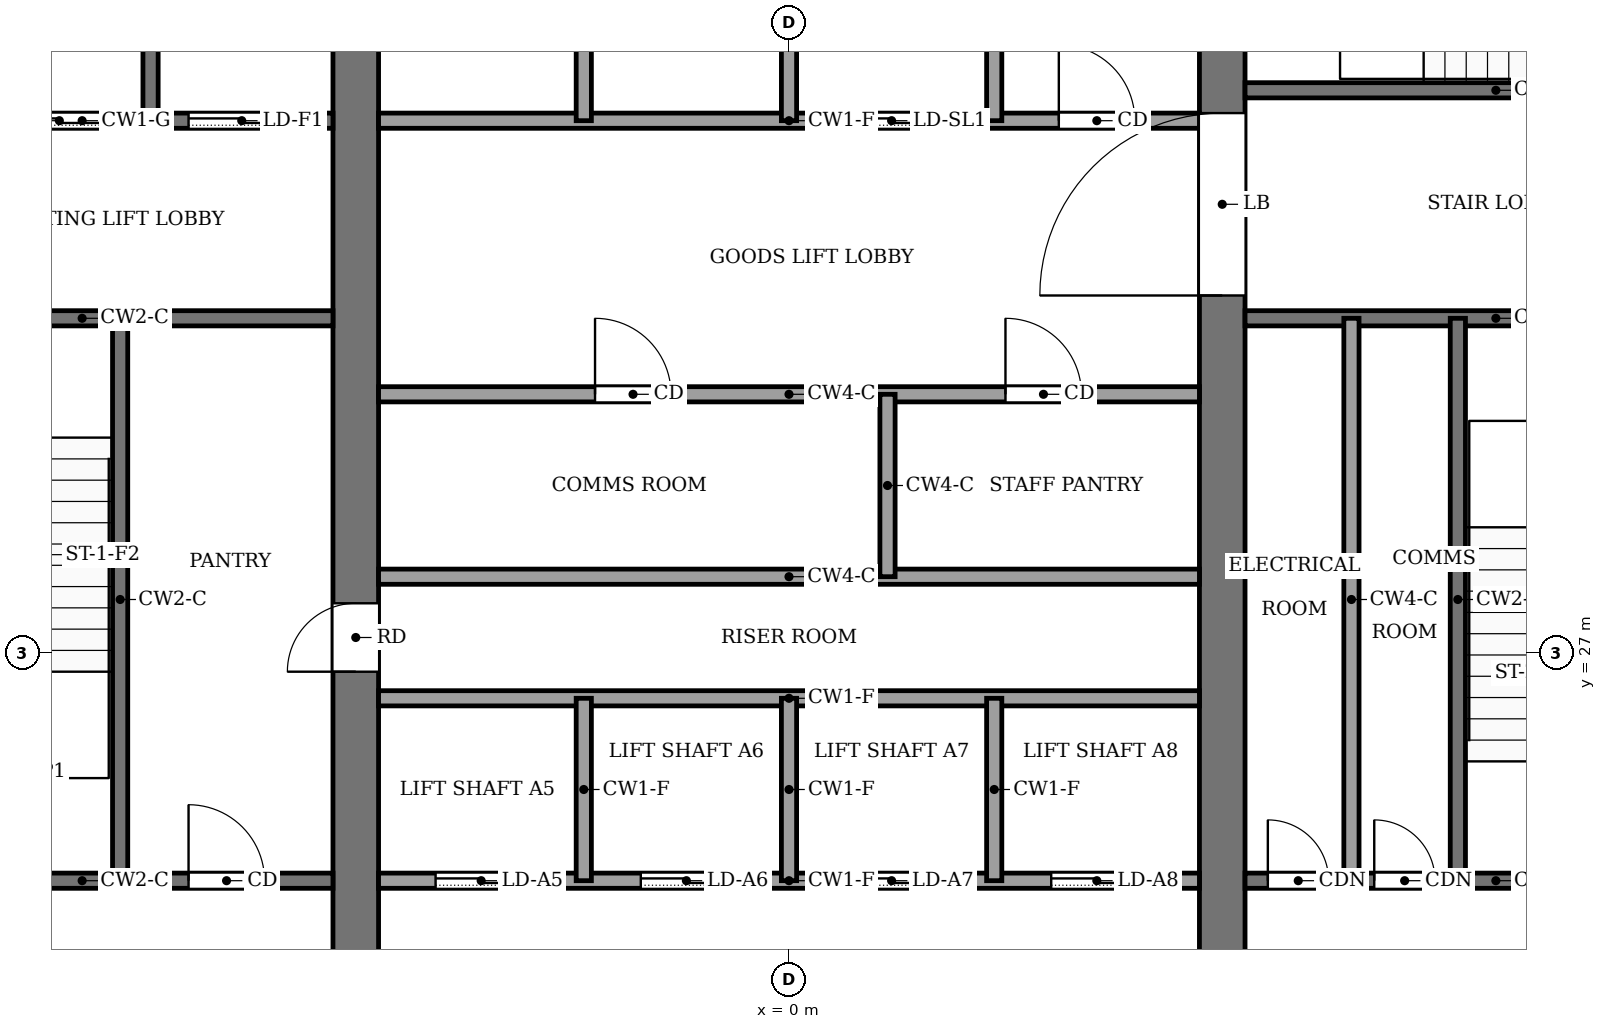
"""IFC4 building model, lengths in metres.
Left out: names, types, materials, properties, quantities, classifications, styles, units other than length and angle.
Written with IfcOpenShell. Run it as: python <this file> out.ifc"""

import sys

from ifc_helpers import new_model, si_unit, direction, frame, frame_2d, origin, place, context, subcontext, project, spatial, rectangle, extrude, element, fill, save


model = new_model("IFC4")
c1 = context("Model", 3, precision=1e-05, world=origin(), true_north=direction((0.0, 1.0)))
c2 = subcontext(c1, "Body", "Model", "MODEL_VIEW")
j1 = project(units=[si_unit("LENGTHUNIT", "METRE"), si_unit("PLANEANGLEUNIT", "RADIAN")], contexts=[c1])
p1 = place(None, origin())
s1 = spatial("IfcSite", under=j1, at=p1, CompositionType="ELEMENT")
p2 = place(p1, origin())
s2 = spatial("IfcBuilding", under=s1, at=p2, CompositionType="ELEMENT")
p3 = place(p2, frame((0.0, 0.0, 210.0)))
s3 = spatial("IfcBuildingStorey", under=s2, at=p3, CompositionType="ELEMENT", Elevation=210.0)
p4 = place(p3, frame((-5.7, 18.4, -0.13), z_axis=(0.0, 0.0, 1.0), x_axis=(0.0, 1.0, 0.0)))
e1 = element("IfcWall", 1, at=p4, inside=s3, PredefinedType="SHEAR", context=c2, shape_type="SweptSolid", body=[
    extrude(rectangle(XDim=19.2, YDim=0.6, at=frame_2d((9.6, 0.0))), origin(), (0.0, 0.0, 1.0), 4.0),
])
p5 = place(p4, frame((8.35, 0.0, 0.13)))
e2 = element("IfcOpeningElement", 2, at=p5, cuts=e1, PredefinedType="OPENING", context=c2, shape_type="SweptSolid", body=[
    extrude(rectangle(XDim=0.9, YDim=2.1, at=frame_2d((0.45, 1.05))), frame((0.0, 0.31, 0.0), z_axis=(0.0, -1.0, 0.0), x_axis=(1.0, 0.0, 0.0)), (0.0, 0.0, 1.0), 0.62),
])
p6 = place(p3, frame((5.7, 18.4, -0.13), z_axis=(0.0, 0.0, 1.0), x_axis=(0.0, 1.0, 0.0)))
e3 = element("IfcWall", 3, at=p6, inside=s3, PredefinedType="SHEAR", context=c2, shape_type="SweptSolid", body=[
    extrude(rectangle(XDim=19.2, YDim=0.6, at=frame_2d((9.6, 0.0))), origin(), (0.0, 0.0, 1.0), 4.0),
])
p7 = place(p6, frame((13.3, 0.0, 0.13)))
e4 = element("IfcOpeningElement", 4, at=p7, cuts=e3, PredefinedType="OPENING", context=c2, shape_type="SweptSolid", body=[
    extrude(rectangle(XDim=2.4, YDim=2.4, at=frame_2d((1.2, 1.2))), frame((0.0, 0.31, 0.0), z_axis=(0.0, -1.0, 0.0), x_axis=(1.0, 0.0, 0.0)), (0.0, 0.0, 1.0), 0.62),
])
p8 = place(p3, frame((-12.6, 24.0, 0.0), z_axis=(0.0, 0.0, 1.0), x_axis=(1.0, 0.0, 0.0)))
e5 = element("IfcWall", 5, at=p8, inside=s3, PredefinedType="PARTITIONING", context=c2, shape_type="SweptSolid", body=[
    extrude(rectangle(XDim=6.6, YDim=0.2, at=frame_2d((3.3, 0.0))), origin(), (0.0, 0.0, 1.0), 3.87),
])
p9 = place(p8, frame((4.7, 0.0, 0.0)))
e6 = element("IfcOpeningElement", 6, at=p9, cuts=e5, PredefinedType="OPENING", context=c2, shape_type="SweptSolid", body=[
    extrude(rectangle(XDim=1.0, YDim=2.1, at=frame_2d((0.5, 1.05))), frame((0.0, 0.11, 0.0), z_axis=(0.0, -1.0, 0.0), x_axis=(1.0, 0.0, 0.0)), (0.0, 0.0, 1.0), 0.22),
])
p10 = place(p3, frame((-5.4, 24.0, 0.0), z_axis=(0.0, 0.0, 1.0), x_axis=(1.0, 0.0, 0.0)))
e7 = element("IfcWall", 7, at=p10, inside=s3, PredefinedType="PARTITIONING", context=c2, shape_type="SweptSolid", body=[
    extrude(rectangle(XDim=10.8, YDim=0.2, at=frame_2d((5.4, 0.0))), origin(), (0.0, 0.0, 1.0), 3.87),
])
p11 = place(p10, frame((0.75, 0.0, 0.0)))
e8 = element("IfcOpeningElement", 8, at=p11, cuts=e7, PredefinedType="OPENING", context=c2, shape_type="SweptSolid", body=[
    extrude(rectangle(XDim=1.2, YDim=2.2, at=frame_2d((0.6, 1.1))), frame((0.0, 0.11, 0.0), z_axis=(0.0, -1.0, 0.0), x_axis=(1.0, 0.0, 0.0)), (0.0, 0.0, 1.0), 0.22),
])
p12 = place(p10, frame((3.45, 0.0, 0.0)))
e9 = element("IfcOpeningElement", 9, at=p12, cuts=e7, PredefinedType="OPENING", context=c2, shape_type="SweptSolid", body=[
    extrude(rectangle(XDim=1.2, YDim=2.2, at=frame_2d((0.6, 1.1))), frame((0.0, 0.11, 0.0), z_axis=(0.0, -1.0, 0.0), x_axis=(1.0, 0.0, 0.0)), (0.0, 0.0, 1.0), 0.22),
])
p13 = place(p10, frame((6.15, 0.0, 0.0)))
e10 = element("IfcOpeningElement", 10, at=p13, cuts=e7, PredefinedType="OPENING", context=c2, shape_type="SweptSolid", body=[
    extrude(rectangle(XDim=1.2, YDim=2.2, at=frame_2d((0.6, 1.1))), frame((0.0, 0.11, 0.0), z_axis=(0.0, -1.0, 0.0), x_axis=(1.0, 0.0, 0.0)), (0.0, 0.0, 1.0), 0.22),
])
p14 = place(p10, frame((8.85, 0.0, 0.0)))
e11 = element("IfcOpeningElement", 11, at=p14, cuts=e7, PredefinedType="OPENING", context=c2, shape_type="SweptSolid", body=[
    extrude(rectangle(XDim=1.2, YDim=2.2, at=frame_2d((0.6, 1.1))), frame((0.0, 0.11, 0.0), z_axis=(0.0, -1.0, 0.0), x_axis=(1.0, 0.0, 0.0)), (0.0, 0.0, 1.0), 0.22),
])
p15 = place(p3, frame((6.0, 24.0, 0.0), z_axis=(0.0, 0.0, 1.0), x_axis=(1.0, 0.0, 0.0)))
e12 = element("IfcWall", 12, at=p15, inside=s3, PredefinedType="PARTITIONING", context=c2, shape_type="SweptSolid", body=[
    extrude(rectangle(XDim=6.6, YDim=0.2, at=frame_2d((3.3, 0.0))), origin(), (0.0, 0.0, 1.0), 3.87),
])
p16 = place(p15, frame((0.3, 0.0, 0.0)))
e13 = element("IfcOpeningElement", 13, at=p16, cuts=e12, PredefinedType="OPENING", context=c2, shape_type="SweptSolid", body=[
    extrude(rectangle(XDim=0.8, YDim=2.1, at=frame_2d((0.4, 1.05))), frame((0.0, 0.11, 0.0), z_axis=(0.0, -1.0, 0.0), x_axis=(1.0, 0.0, 0.0)), (0.0, 0.0, 1.0), 0.22),
])
p17 = place(p15, frame((1.7, 0.0, 0.0)))
e14 = element("IfcOpeningElement", 14, at=p17, cuts=e12, PredefinedType="OPENING", context=c2, shape_type="SweptSolid", body=[
    extrude(rectangle(XDim=0.8, YDim=2.1, at=frame_2d((0.4, 1.05))), frame((0.0, 0.11, 0.0), z_axis=(0.0, -1.0, 0.0), x_axis=(1.0, 0.0, 0.0)), (0.0, 0.0, 1.0), 0.22),
])
p18 = place(p15, frame((4.4, 0.0, 0.0)))
e15 = element("IfcOpeningElement", 15, at=p18, cuts=e12, PredefinedType="OPENING", context=c2, shape_type="SweptSolid", body=[
    extrude(rectangle(XDim=1.2, YDim=2.2, at=frame_2d((0.6, 1.1))), frame((0.0, 0.11, 0.0), z_axis=(0.0, -1.0, 0.0), x_axis=(1.0, 0.0, 0.0)), (0.0, 0.0, 1.0), 0.22),
])
for number, where, z_axis, x_axis in (
    (16, (-5.4, 26.4, 0.0), (0.0, 0.0, 1.0), (1.0, 0.0, 0.0)),
    (17, (-5.4, 28.0, 0.0), (0.0, 0.0, 1.0), (1.0, 0.0, 0.0)),
):
    element("IfcWall", number, at=place(p3, frame(where, z_axis=z_axis, x_axis=x_axis)), inside=s3, PredefinedType="PARTITIONING", context=c2, shape_type="SweptSolid", body=[
        extrude(rectangle(XDim=10.8, YDim=0.2, at=frame_2d((5.4, 0.0))), origin(), (0.0, 0.0, 1.0), 3.87),
    ])
p19 = place(p3, frame((-5.4, 30.4, 0.0), z_axis=(0.0, 0.0, 1.0), x_axis=(1.0, 0.0, 0.0)))
e18 = element("IfcWall", 18, at=p19, inside=s3, PredefinedType="PARTITIONING", context=c2, shape_type="SweptSolid", body=[
    extrude(rectangle(XDim=10.8, YDim=0.2, at=frame_2d((5.4, 0.0))), origin(), (0.0, 0.0, 1.0), 3.87),
])
p20 = place(p19, frame((2.848, 0.0, 0.0)))
e19 = element("IfcOpeningElement", 19, at=p20, cuts=e18, PredefinedType="OPENING", context=c2, shape_type="SweptSolid", body=[
    extrude(rectangle(XDim=1.0, YDim=2.1, at=frame_2d((0.5, 1.05))), frame((0.0, 0.11, 0.0), z_axis=(0.0, -1.0, 0.0), x_axis=(1.0, 0.0, 0.0)), (0.0, 0.0, 1.0), 0.22),
])
p21 = place(p19, frame((8.248, 0.0, 0.0)))
e20 = element("IfcOpeningElement", 20, at=p21, cuts=e18, PredefinedType="OPENING", context=c2, shape_type="SweptSolid", body=[
    extrude(rectangle(XDim=1.0, YDim=2.1, at=frame_2d((0.5, 1.05))), frame((0.0, 0.11, 0.0), z_axis=(0.0, -1.0, 0.0), x_axis=(1.0, 0.0, 0.0)), (0.0, 0.0, 1.0), 0.22),
])
p22 = place(p3, frame((-12.6, 31.4, 0.0), z_axis=(0.0, 0.0, 1.0), x_axis=(1.0, 0.0, 0.0)))
e21 = element("IfcWall", 21, at=p22, inside=s3, PredefinedType="PARTITIONING", context=c2, shape_type="SweptSolid", body=[
    extrude(rectangle(XDim=6.6, YDim=0.2, at=frame_2d((3.3, 0.0))), origin(), (0.0, 0.0, 1.0), 3.87),
])
p23 = place(p22, frame((1.0, 0.0, 0.0)))
e22 = element("IfcOpeningElement", 22, at=p23, cuts=e21, PredefinedType="OPENING", context=c2, shape_type="SweptSolid", body=[
    extrude(rectangle(XDim=1.2, YDim=2.2, at=frame_2d((0.6, 1.1))), frame((0.0, 0.11, 0.0), z_axis=(0.0, -1.0, 0.0), x_axis=(1.0, 0.0, 0.0)), (0.0, 0.0, 1.0), 0.22),
])
p24 = place(p3, frame((6.0, 31.4, 0.0), z_axis=(0.0, 0.0, 1.0), x_axis=(1.0, 0.0, 0.0)))
e23 = element("IfcWall", 23, at=p24, inside=s3, PredefinedType="PARTITIONING", context=c2, shape_type="SweptSolid", body=[
    extrude(rectangle(XDim=6.6, YDim=0.2, at=frame_2d((3.3, 0.0))), origin(), (0.0, 0.0, 1.0), 3.87),
])
p25 = place(p3, frame((-12.6, 34.0, 0.0), z_axis=(0.0, 0.0, 1.0), x_axis=(1.0, 0.0, 0.0)))
e24 = element("IfcWall", 24, at=p25, inside=s3, PredefinedType="PARTITIONING", context=c2, shape_type="SweptSolid", body=[
    extrude(rectangle(XDim=6.6, YDim=0.2, at=frame_2d((3.3, 0.0))), origin(), (0.0, 0.0, 1.0), 3.87),
])
p26 = place(p25, frame((4.7, 0.0, 0.0)))
e25 = element("IfcOpeningElement", 25, at=p26, cuts=e24, PredefinedType="OPENING", context=c2, shape_type="SweptSolid", body=[
    extrude(rectangle(XDim=1.4, YDim=2.2, at=frame_2d((0.7, 1.1))), frame((0.0, 0.11, 0.0), z_axis=(0.0, -1.0, 0.0), x_axis=(1.0, 0.0, 0.0)), (0.0, 0.0, 1.0), 0.22),
])
p27 = place(p25, frame((2.3, 0.0, 0.0)))
e26 = element("IfcOpeningElement", 26, at=p27, cuts=e24, PredefinedType="OPENING", context=c2, shape_type="SweptSolid", body=[
    extrude(rectangle(XDim=1.4, YDim=2.2, at=frame_2d((0.7, 1.1))), frame((0.0, 0.11, 0.0), z_axis=(0.0, -1.0, 0.0), x_axis=(1.0, 0.0, 0.0)), (0.0, 0.0, 1.0), 0.22),
])
p28 = place(p25, frame((0.45, 0.0, 0.0)))
e27 = element("IfcOpeningElement", 27, at=p28, cuts=e24, PredefinedType="OPENING", context=c2, shape_type="SweptSolid", body=[
    extrude(rectangle(XDim=0.9, YDim=2.1, at=frame_2d((0.45, 1.05))), frame((0.0, 0.11, 0.0), z_axis=(0.0, -1.0, 0.0), x_axis=(1.0, 0.0, 0.0)), (0.0, 0.0, 1.0), 0.22),
])
p29 = place(p3, frame((-5.4, 34.0, 0.0), z_axis=(0.0, 0.0, 1.0), x_axis=(1.0, 0.0, 0.0)))
e28 = element("IfcWall", 28, at=p29, inside=s3, PredefinedType="PARTITIONING", context=c2, shape_type="SweptSolid", body=[
    extrude(rectangle(XDim=10.8, YDim=0.2, at=frame_2d((5.4, 0.0))), origin(), (0.0, 0.0, 1.0), 3.87),
])
p30 = place(p29, frame((6.15, 0.0, 0.0)))
e29 = element("IfcOpeningElement", 29, at=p30, cuts=e28, PredefinedType="OPENING", context=c2, shape_type="SweptSolid", body=[
    extrude(rectangle(XDim=1.2, YDim=2.2, at=frame_2d((0.6, 1.1))), frame((0.0, 0.11, 0.0), z_axis=(0.0, -1.0, 0.0), x_axis=(1.0, 0.0, 0.0)), (0.0, 0.0, 1.0), 0.22),
])
p31 = place(p29, frame((8.95, 0.0, 0.0)))
e30 = element("IfcOpeningElement", 30, at=p31, cuts=e28, PredefinedType="OPENING", context=c2, shape_type="SweptSolid", body=[
    extrude(rectangle(XDim=1.0, YDim=2.1, at=frame_2d((0.5, 1.05))), frame((0.0, 0.11, 0.0), z_axis=(0.0, -1.0, 0.0), x_axis=(1.0, 0.0, 0.0)), (0.0, 0.0, 1.0), 0.22),
])
p32 = place(p3, frame((6.0, 34.4, 0.0), z_axis=(0.0, 0.0, 1.0), x_axis=(1.0, 0.0, 0.0)))
e31 = element("IfcWall", 31, at=p32, inside=s3, PredefinedType="PARTITIONING", context=c2, shape_type="SweptSolid", body=[
    extrude(rectangle(XDim=6.6, YDim=0.2, at=frame_2d((3.3, 0.0))), origin(), (0.0, 0.0, 1.0), 3.87),
])
p33 = place(p32, frame((4.8, 0.0, 0.0)))
e32 = element("IfcOpeningElement", 32, at=p33, cuts=e31, PredefinedType="OPENING", context=c2, shape_type="SweptSolid", body=[
    extrude(rectangle(XDim=1.2, YDim=2.2, at=frame_2d((0.6, 1.1))), frame((0.0, 0.11, 0.0), z_axis=(0.0, -1.0, 0.0), x_axis=(1.0, 0.0, 0.0)), (0.0, 0.0, 1.0), 0.22),
])
p34 = place(p3, frame((-8.8, 24.0, 0.0), z_axis=(0.0, 0.0, 1.0), x_axis=(0.0, 1.0, 0.0)))
e33 = element("IfcWall", 33, at=p34, inside=s3, PredefinedType="PARTITIONING", context=c2, shape_type="SweptSolid", body=[
    extrude(rectangle(XDim=7.4, YDim=0.2, at=frame_2d((3.7, 0.0))), origin(), (0.0, 0.0, 1.0), 3.87),
])
p35 = place(p3, frame((-8.4, 34.0, 0.0), z_axis=(0.0, 0.0, 1.0), x_axis=(0.0, 1.0, 0.0)))
e34 = element("IfcWall", 34, at=p35, inside=s3, PredefinedType="PARTITIONING", context=c2, shape_type="SweptSolid", body=[
    extrude(rectangle(XDim=3.6, YDim=0.2, at=frame_2d((1.8, 0.0))), origin(), (0.0, 0.0, 1.0), 3.87),
])
p36 = place(p3, frame((-2.7, 24.0, 0.0), z_axis=(0.0, 0.0, 1.0), x_axis=(0.0, 1.0, 0.0)))
e35 = element("IfcWall", 35, at=p36, inside=s3, PredefinedType="PARTITIONING", context=c2, shape_type="SweptSolid", body=[
    extrude(rectangle(XDim=2.4, YDim=0.2, at=frame_2d((1.2, 0.0))), origin(), (0.0, 0.0, 1.0), 3.87),
])
p37 = place(p3, frame((-2.7, 34.0, 0.0), z_axis=(0.0, 0.0, 1.0), x_axis=(0.0, 1.0, 0.0)))
e36 = element("IfcWall", 36, at=p37, inside=s3, PredefinedType="PARTITIONING", context=c2, shape_type="SweptSolid", body=[
    extrude(rectangle(XDim=3.6, YDim=0.2, at=frame_2d((1.8, 0.0))), origin(), (0.0, 0.0, 1.0), 3.87),
])
p38 = place(p3, frame((0.0, 24.0, 0.0), z_axis=(0.0, 0.0, 1.0), x_axis=(0.0, 1.0, 0.0)))
e37 = element("IfcWall", 37, at=p38, inside=s3, PredefinedType="PARTITIONING", context=c2, shape_type="SweptSolid", body=[
    extrude(rectangle(XDim=2.4, YDim=0.2, at=frame_2d((1.2, 0.0))), origin(), (0.0, 0.0, 1.0), 3.87),
])
p39 = place(p3, frame((0.0, 34.0, 0.0), z_axis=(0.0, 0.0, 1.0), x_axis=(0.0, 1.0, 0.0)))
e38 = element("IfcWall", 38, at=p39, inside=s3, PredefinedType="PARTITIONING", context=c2, shape_type="SweptSolid", body=[
    extrude(rectangle(XDim=3.6, YDim=0.2, at=frame_2d((1.8, 0.0))), origin(), (0.0, 0.0, 1.0), 3.87),
])
for number, where, z_axis, x_axis in (
    (39, (1.296, 28.0, 0.0), (0.0, 0.0, 1.0), (0.0, 1.0, 0.0)),
    (40, (2.7, 24.0, 0.0), (0.0, 0.0, 1.0), (0.0, 1.0, 0.0)),
):
    element("IfcWall", number, at=place(p3, frame(where, z_axis=z_axis, x_axis=x_axis)), inside=s3, PredefinedType="PARTITIONING", context=c2, shape_type="SweptSolid", body=[
        extrude(rectangle(XDim=2.4, YDim=0.2, at=frame_2d((1.2, 0.0))), origin(), (0.0, 0.0, 1.0), 3.87),
    ])
p40 = place(p3, frame((2.7, 34.0, 0.0), z_axis=(0.0, 0.0, 1.0), x_axis=(0.0, 1.0, 0.0)))
e41 = element("IfcWall", 41, at=p40, inside=s3, PredefinedType="PARTITIONING", context=c2, shape_type="SweptSolid", body=[
    extrude(rectangle(XDim=3.6, YDim=0.2, at=frame_2d((1.8, 0.0))), origin(), (0.0, 0.0, 1.0), 3.87),
])
for number, where, z_axis, x_axis in (
    (42, (7.4, 24.0, 0.0), (0.0, 0.0, 1.0), (0.0, 1.0, 0.0)),
    (43, (8.8, 24.0, 0.0), (0.0, 0.0, 1.0), (0.0, 1.0, 0.0)),
):
    element("IfcWall", number, at=place(p3, frame(where, z_axis=z_axis, x_axis=x_axis)), inside=s3, PredefinedType="PARTITIONING", context=c2, shape_type="SweptSolid", body=[
        extrude(rectangle(XDim=7.4, YDim=0.2, at=frame_2d((3.7, 0.0))), origin(), (0.0, 0.0, 1.0), 3.87),
    ])
p41 = place(p11, origin())
e44 = element("IfcDoor", 44, at=p41, inside=s3, OperationType="SLIDING_TO_LEFT", PredefinedType="DOOR", context=c2, shape_type="SweptSolid", body=[
    extrude(rectangle(XDim=1.2, YDim=2.2, at=frame_2d((0.6, 1.1))), frame((0.0, 0.025, 0.0), z_axis=(0.0, -1.0, 0.0), x_axis=(1.0, 0.0, 0.0)), (0.0, 0.0, 1.0), 0.05),
])
fill(e8, e44)
p42 = place(p12, origin())
e45 = element("IfcDoor", 45, at=p42, inside=s3, OperationType="SLIDING_TO_LEFT", PredefinedType="DOOR", context=c2, shape_type="SweptSolid", body=[
    extrude(rectangle(XDim=1.2, YDim=2.2, at=frame_2d((0.6, 1.1))), frame((0.0, 0.025, 0.0), z_axis=(0.0, -1.0, 0.0), x_axis=(1.0, 0.0, 0.0)), (0.0, 0.0, 1.0), 0.05),
])
fill(e9, e45)
p43 = place(p13, origin())
e46 = element("IfcDoor", 46, at=p43, inside=s3, OperationType="SLIDING_TO_LEFT", PredefinedType="DOOR", context=c2, shape_type="SweptSolid", body=[
    extrude(rectangle(XDim=1.2, YDim=2.2, at=frame_2d((0.6, 1.1))), frame((0.0, 0.025, 0.0), z_axis=(0.0, -1.0, 0.0), x_axis=(1.0, 0.0, 0.0)), (0.0, 0.0, 1.0), 0.05),
])
fill(e10, e46)
p44 = place(p14, origin())
e47 = element("IfcDoor", 47, at=p44, inside=s3, OperationType="SLIDING_TO_LEFT", PredefinedType="DOOR", context=c2, shape_type="SweptSolid", body=[
    extrude(rectangle(XDim=1.2, YDim=2.2, at=frame_2d((0.6, 1.1))), frame((0.0, 0.025, 0.0), z_axis=(0.0, -1.0, 0.0), x_axis=(1.0, 0.0, 0.0)), (0.0, 0.0, 1.0), 0.05),
])
fill(e11, e47)
p45 = place(p30, origin())
e48 = element("IfcDoor", 48, at=p45, inside=s3, OperationType="SLIDING_TO_LEFT", PredefinedType="DOOR", context=c2, shape_type="SweptSolid", body=[
    extrude(rectangle(XDim=1.2, YDim=2.2, at=frame_2d((0.6, 1.1))), frame((0.0, 0.025, 0.0), z_axis=(0.0, -1.0, 0.0), x_axis=(1.0, 0.0, 0.0)), (0.0, 0.0, 1.0), 0.05),
])
fill(e29, e48)
p46 = place(p26, origin())
e49 = element("IfcDoor", 49, at=p46, inside=s3, OperationType="SLIDING_TO_LEFT", PredefinedType="DOOR", context=c2, shape_type="SweptSolid", body=[
    extrude(rectangle(XDim=1.4, YDim=2.2, at=frame_2d((0.7, 1.1))), frame((0.0, 0.025, 0.0), z_axis=(0.0, -1.0, 0.0), x_axis=(1.0, 0.0, 0.0)), (0.0, 0.0, 1.0), 0.05),
])
fill(e25, e49)
p47 = place(p27, origin())
e50 = element("IfcDoor", 50, at=p47, inside=s3, OperationType="SLIDING_TO_LEFT", PredefinedType="DOOR", context=c2, shape_type="SweptSolid", body=[
    extrude(rectangle(XDim=1.4, YDim=2.2, at=frame_2d((0.7, 1.1))), frame((0.0, 0.025, 0.0), z_axis=(0.0, -1.0, 0.0), x_axis=(1.0, 0.0, 0.0)), (0.0, 0.0, 1.0), 0.05),
])
fill(e26, e50)
p48 = place(p20, origin())
e51 = element("IfcDoor", 51, at=p48, inside=s3, OperationType="SINGLE_SWING_LEFT", PredefinedType="DOOR", context=c2, shape_type="SweptSolid", body=[
    extrude(rectangle(XDim=1.0, YDim=2.1, at=frame_2d((0.5, 1.05))), frame((0.0, 0.025, 0.0), z_axis=(0.0, -1.0, 0.0), x_axis=(1.0, 0.0, 0.0)), (0.0, 0.0, 1.0), 0.05),
])
fill(e19, e51)
p49 = place(p21, origin())
e52 = element("IfcDoor", 52, at=p49, inside=s3, OperationType="SINGLE_SWING_RIGHT", PredefinedType="DOOR", context=c2, shape_type="SweptSolid", body=[
    extrude(rectangle(XDim=1.0, YDim=2.1, at=frame_2d((0.5, 1.05))), frame((0.0, 0.025, 0.0), z_axis=(0.0, -1.0, 0.0), x_axis=(1.0, 0.0, 0.0)), (0.0, 0.0, 1.0), 0.05),
])
fill(e20, e52)
p50 = place(p9, origin())
e53 = element("IfcDoor", 53, at=p50, inside=s3, OperationType="SINGLE_SWING_RIGHT", PredefinedType="DOOR", context=c2, shape_type="SweptSolid", body=[
    extrude(rectangle(XDim=1.0, YDim=2.1, at=frame_2d((0.5, 1.05))), frame((0.0, 0.025, 0.0), z_axis=(0.0, -1.0, 0.0), x_axis=(1.0, 0.0, 0.0)), (0.0, 0.0, 1.0), 0.05),
])
fill(e6, e53)
p51 = place(p16, origin())
e54 = element("IfcDoor", 54, at=p51, inside=s3, OperationType="SINGLE_SWING_RIGHT", PredefinedType="DOOR", context=c2, shape_type="SweptSolid", body=[
    extrude(rectangle(XDim=0.8, YDim=2.1, at=frame_2d((0.4, 1.05))), frame((0.0, 0.025, 0.0), z_axis=(0.0, -1.0, 0.0), x_axis=(1.0, 0.0, 0.0)), (0.0, 0.0, 1.0), 0.05),
])
fill(e13, e54)
p52 = place(p17, origin())
e55 = element("IfcDoor", 55, at=p52, inside=s3, OperationType="SINGLE_SWING_LEFT", PredefinedType="DOOR", context=c2, shape_type="SweptSolid", body=[
    extrude(rectangle(XDim=0.8, YDim=2.1, at=frame_2d((0.4, 1.05))), frame((0.0, 0.025, 0.0), z_axis=(0.0, -1.0, 0.0), x_axis=(1.0, 0.0, 0.0)), (0.0, 0.0, 1.0), 0.05),
])
fill(e14, e55)
p53 = place(p31, origin())
e56 = element("IfcDoor", 56, at=p53, inside=s3, OperationType="SINGLE_SWING_LEFT", PredefinedType="DOOR", context=c2, shape_type="SweptSolid", body=[
    extrude(rectangle(XDim=1.0, YDim=2.1, at=frame_2d((0.5, 1.05))), frame((0.0, 0.025, 0.0), z_axis=(0.0, -1.0, 0.0), x_axis=(1.0, 0.0, 0.0)), (0.0, 0.0, 1.0), 0.05),
])
fill(e30, e56)
p54 = place(p5, origin())
e57 = element("IfcDoor", 57, at=p54, inside=s3, OperationType="SINGLE_SWING_LEFT", PredefinedType="DOOR", context=c2, shape_type="SweptSolid", body=[
    extrude(rectangle(XDim=0.9, YDim=2.1, at=frame_2d((0.45, 1.05))), frame((0.0, 0.025, 0.0), z_axis=(0.0, -1.0, 0.0), x_axis=(1.0, 0.0, 0.0)), (0.0, 0.0, 1.0), 0.05),
])
fill(e2, e57)
p55 = place(p7, origin())
e58 = element("IfcDoor", 58, at=p55, inside=s3, OperationType="DOUBLE_DOOR_SINGLE_SWING", PredefinedType="DOOR", context=c2, shape_type="SweptSolid", body=[
    extrude(rectangle(XDim=2.4, YDim=2.4, at=frame_2d((1.2, 1.2))), frame((0.0, 0.025, 0.0), z_axis=(0.0, -1.0, 0.0), x_axis=(1.0, 0.0, 0.0)), (0.0, 0.0, 1.0), 0.05),
])
fill(e4, e58)
save(model, sys.argv[1])
